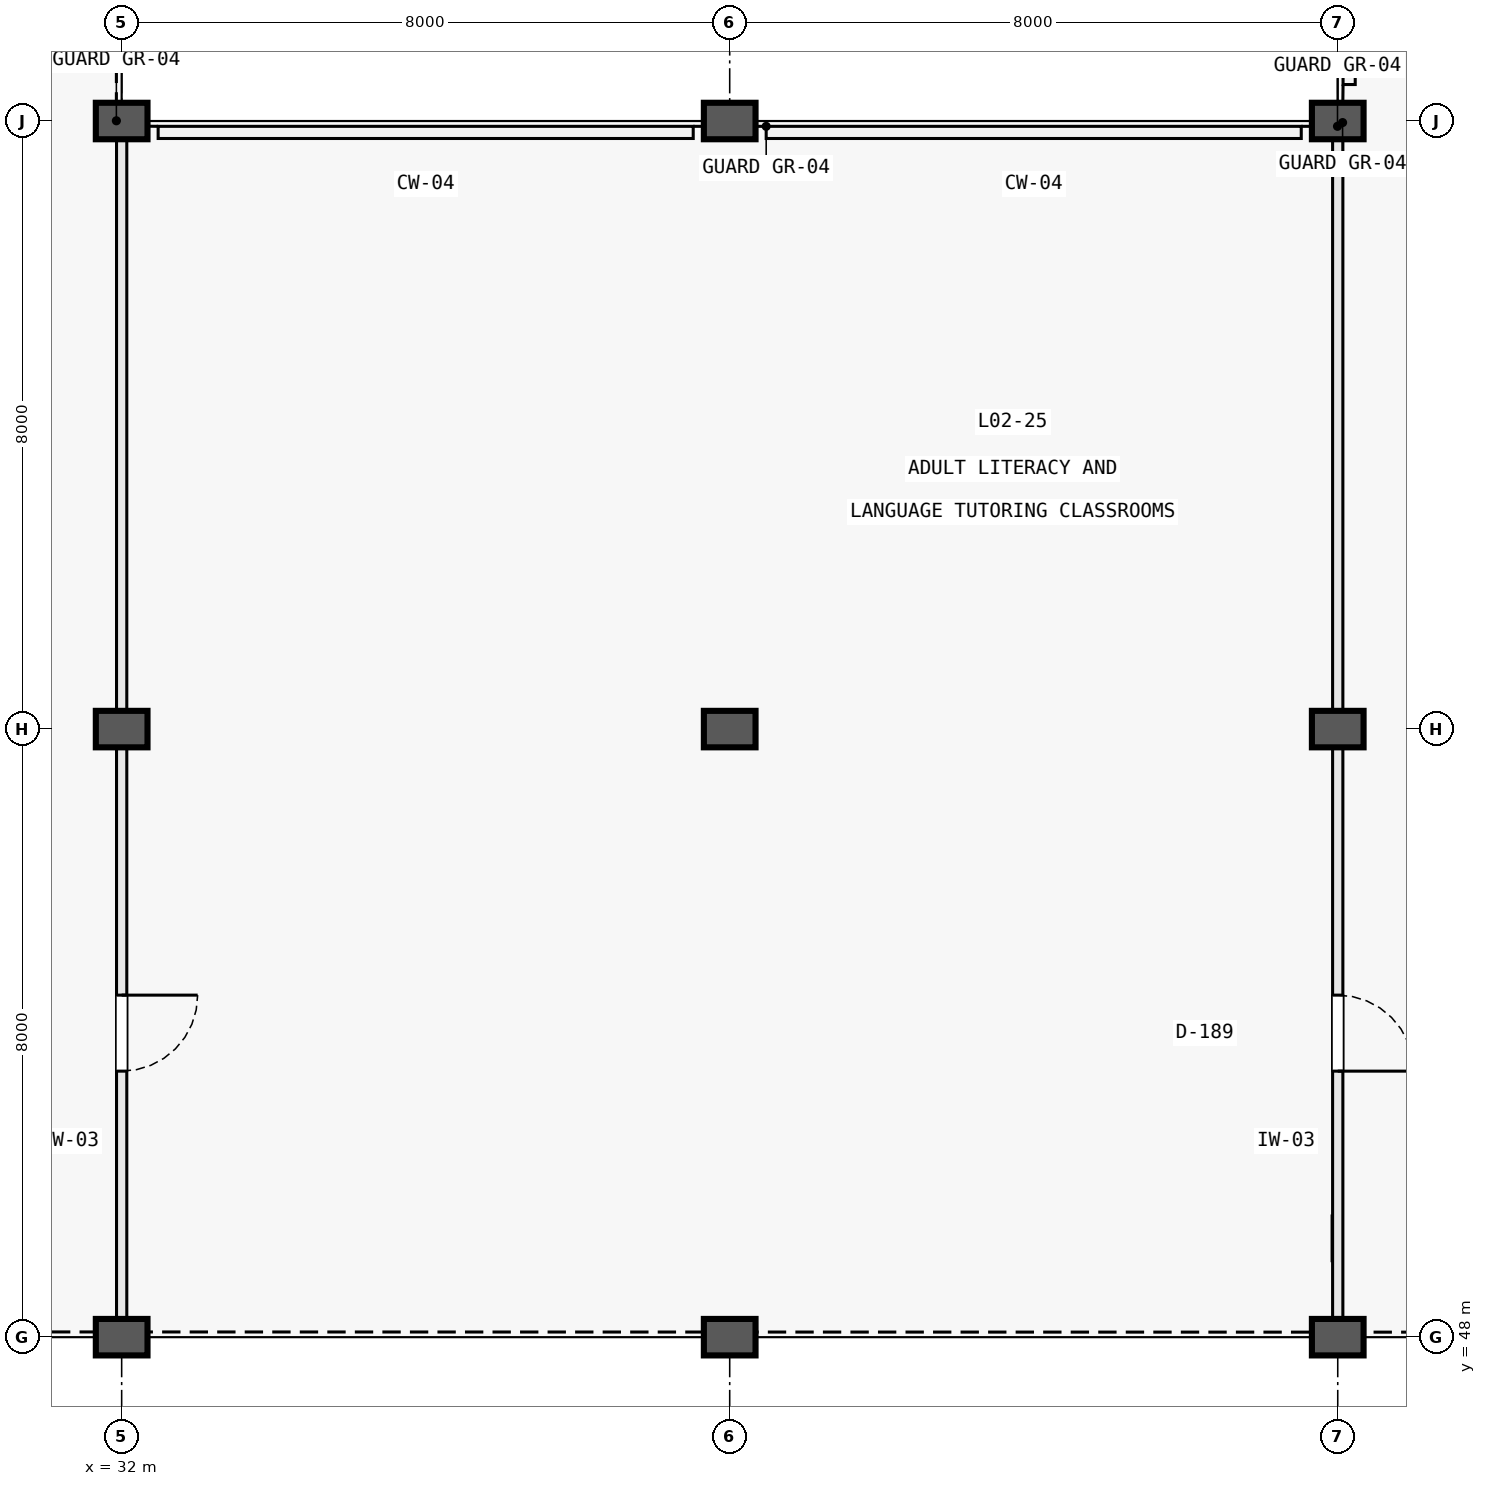
"""IFC4 building model, lengths in metres.
Left out: names, types, materials, properties, quantities, classifications, styles, units other than length and angle.
Written with IfcOpenShell. Run it as: python <this file> out.ifc"""

import sys

from ifc_helpers import new_model, si_unit, direction, frame, frame_2d, origin, origin_2d, place, context, subcontext, project, spatial, rectangle, extrude, element, fill, save


model = new_model("IFC4")
c1 = context("Model", 3, precision=1e-05, world=origin(), true_north=direction((0.0, 1.0)))
c2 = subcontext(c1, "Body", "Model", "MODEL_VIEW")
j1 = project(units=[si_unit("LENGTHUNIT", "METRE"), si_unit("PLANEANGLEUNIT", "RADIAN")], contexts=[c1])
p1 = place(None, origin())
s1 = spatial("IfcSite", under=j1, at=p1, CompositionType="ELEMENT")
p2 = place(p1, origin())
s2 = spatial("IfcBuilding", under=s1, at=p2, CompositionType="ELEMENT")
p3 = place(p2, frame((0.0, 0.0, 5.4)))
s3 = spatial("IfcBuildingStorey", under=s2, at=p3, CompositionType="ELEMENT", Elevation=5.4)
for number, where, z_axis, x_axis in (
    (1, (32.0, 48.0, 0.0), (0.0, 0.0, 1.0), (1.0, 0.0, 0.0)),
    (2, (32.0, 56.0, 0.0), (0.0, 0.0, 1.0), (1.0, 0.0, 0.0)),
    (3, (32.0, 64.0, 0.0), (0.0, 0.0, 1.0), (1.0, 0.0, 0.0)),
    (4, (40.0, 48.0, 0.0), (0.0, 0.0, 1.0), (1.0, 0.0, 0.0)),
    (5, (40.0, 56.0, 0.0), (0.0, 0.0, 1.0), (1.0, 0.0, 0.0)),
    (6, (40.0, 64.0, 0.0), (0.0, 0.0, 1.0), (1.0, 0.0, 0.0)),
    (7, (48.0, 48.0, 0.0), (0.0, 0.0, 1.0), (1.0, 0.0, 0.0)),
    (8, (48.0, 56.0, 0.0), (0.0, 0.0, 1.0), (1.0, 0.0, 0.0)),
    (9, (48.0, 64.0, 0.0), (0.0, 0.0, 1.0), (1.0, 0.0, 0.0)),
):
    element("IfcColumn", number, at=place(p3, frame(where, z_axis=z_axis, x_axis=x_axis)), inside=s3, PredefinedType="COLUMN", context=c2, shape_type="SweptSolid", body=[
        extrude(rectangle(XDim=0.68, YDim=0.48, at=origin_2d()), origin(), (0.0, 0.0, 1.0), 5.1),
    ])
p4 = place(p3, frame((32.0, 48.25, 0.0), z_axis=(0.0, 0.0, 1.0), x_axis=(0.0, 1.0, 0.0)))
e10 = element("IfcWall", 10, at=p4, inside=s3, PredefinedType="PARTITIONING", context=c2, shape_type="SweptSolid", body=[
    extrude(rectangle(XDim=7.5, YDim=0.135, at=frame_2d((3.75, 0.0))), origin(), (0.0, 0.0, 1.0), 3.61),
])
p5 = place(p4, frame((3.25, 0.0, 0.0)))
e11 = element("IfcOpeningElement", 11, at=p5, cuts=e10, PredefinedType="OPENING", context=c2, shape_type="SweptSolid", body=[
    extrude(rectangle(XDim=1.0, YDim=2.15, at=frame_2d((0.5, 1.075))), frame((0.0, 0.08, 0.0), z_axis=(0.0, -1.0, 0.0), x_axis=(1.0, 0.0, 0.0)), (0.0, 0.0, 1.0), 0.159),
])
p6 = place(p3, frame((32.0, 56.25, 0.0), z_axis=(0.0, 0.0, 1.0), x_axis=(0.0, 1.0, 0.0)))
e12 = element("IfcWall", 12, at=p6, inside=s3, PredefinedType="PARTITIONING", context=c2, shape_type="SweptSolid", body=[
    extrude(rectangle(XDim=7.5, YDim=0.135, at=frame_2d((3.75, 0.0))), origin(), (0.0, 0.0, 1.0), 3.61),
])
p7 = place(p3, frame((48.0, 48.25, 0.0), z_axis=(0.0, 0.0, 1.0), x_axis=(0.0, 1.0, 0.0)))
e13 = element("IfcWall", 13, at=p7, inside=s3, PredefinedType="PARTITIONING", context=c2, shape_type="SweptSolid", body=[
    extrude(rectangle(XDim=7.5, YDim=0.135, at=frame_2d((3.75, 0.0))), origin(), (0.0, 0.0, 1.0), 3.61),
])
p8 = place(p7, frame((3.25, 0.0, 0.0)))
e14 = element("IfcOpeningElement", 14, at=p8, cuts=e13, PredefinedType="OPENING", context=c2, shape_type="SweptSolid", body=[
    extrude(rectangle(XDim=1.0, YDim=2.15, at=frame_2d((0.5, 1.075))), frame((0.0, 0.08, 0.0), z_axis=(0.0, -1.0, 0.0), x_axis=(1.0, 0.0, 0.0)), (0.0, 0.0, 1.0), 0.159),
])
p9 = place(p3, frame((48.0, 56.25, 0.0), z_axis=(0.0, 0.0, 1.0), x_axis=(0.0, 1.0, 0.0)))
e15 = element("IfcWall", 15, at=p9, inside=s3, PredefinedType="PARTITIONING", context=c2, shape_type="SweptSolid", body=[
    extrude(rectangle(XDim=7.5, YDim=0.135, at=frame_2d((3.75, 0.0))), origin(), (0.0, 0.0, 1.0), 3.61),
])
p10 = place(p5, frame((1.0, 0.0, 0.0), z_axis=(0.0, 0.0, 1.0), x_axis=(-1.0, 0.0, 0.0)))
e16 = element("IfcDoor", 16, at=p10, inside=s3, OperationType="SINGLE_SWING_RIGHT", PredefinedType="DOOR", context=c2, shape_type="SweptSolid", body=[
    extrude(rectangle(XDim=1.0, YDim=2.15, at=frame_2d((0.5, 1.075))), frame((0.0, 0.025, 0.0), z_axis=(0.0, -1.0, 0.0), x_axis=(1.0, 0.0, 0.0)), (0.0, 0.0, 1.0), 0.05),
])
fill(e11, e16)
p11 = place(p8, frame((1.0, 0.0, 0.0), z_axis=(0.0, 0.0, 1.0), x_axis=(-1.0, 0.0, 0.0)))
e17 = element("IfcDoor", 17, at=p11, inside=s3, OperationType="SINGLE_SWING_LEFT", PredefinedType="DOOR", context=c2, shape_type="SweptSolid", body=[
    extrude(rectangle(XDim=1.0, YDim=2.15, at=frame_2d((0.5, 1.075))), frame((0.0, 0.025, 0.0), z_axis=(0.0, -1.0, 0.0), x_axis=(1.0, 0.0, 0.0)), (0.0, 0.0, 1.0), 0.05),
])
fill(e14, e17)
save(model, sys.argv[1])
